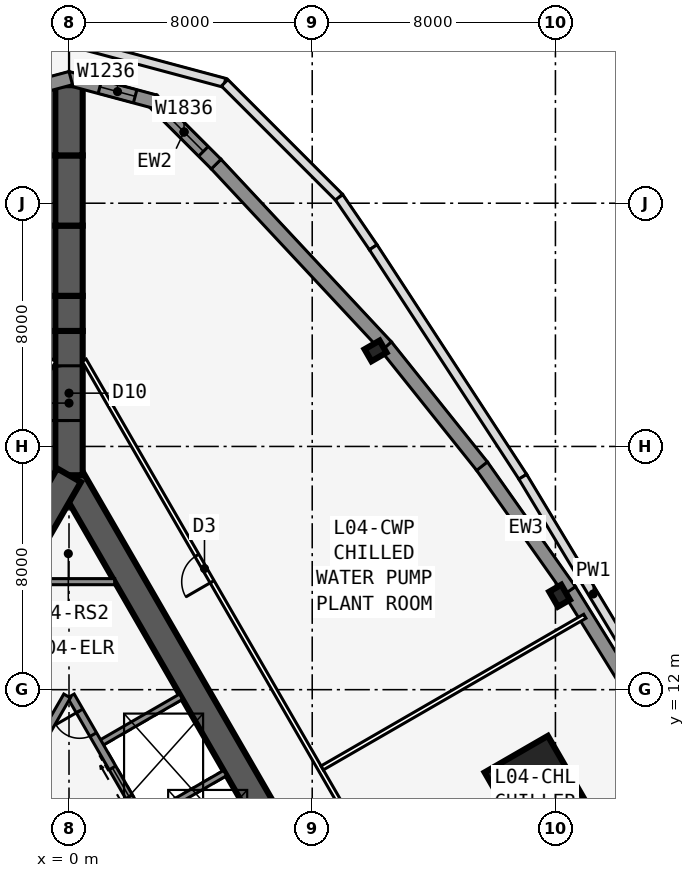
"""IFC4 building model, lengths in metres.
Left out: names, types, materials, properties, quantities, classifications, styles, units other than length and angle.
Written with IfcOpenShell. Run it as: python <this file> out.ifc"""

import sys

from ifc_helpers import new_model, si_unit, direction, frame, frame_2d, origin, origin_2d, place, context, subcontext, project, spatial, polyline, rectangle, i_section, outline, extrude, element, fill, save


model = new_model("IFC4")
c1 = context("Model", 3, precision=1e-05, world=origin(), true_north=direction((0.0, 1.0)))
c2 = subcontext(c1, "Body", "Model", "MODEL_VIEW")
j1 = project(units=[si_unit("LENGTHUNIT", "METRE"), si_unit("PLANEANGLEUNIT", "RADIAN")], contexts=[c1])
p1 = place(None, origin())
s1 = spatial("IfcSite", under=j1, at=p1, CompositionType="ELEMENT")
p2 = place(p1, origin())
s2 = spatial("IfcBuilding", under=s1, at=p2, CompositionType="ELEMENT")
p3 = place(p2, frame((0.0, 0.0, 22.5)))
s3 = spatial("IfcBuildingStorey", under=s2, at=p3, CompositionType="ELEMENT", Elevation=22.5)
p4 = place(p3, frame((16.5, -9.526, 0.0), z_axis=(0.0, 0.0, 1.0), x_axis=(-0.499999749417, 0.866025548458, 0.0)))
e1 = element("IfcWall", 1, at=p4, inside=s3, PredefinedType="SHEAR", context=c2, shape_type="SweptSolid", body=[
    extrude(rectangle(XDim=33.0, YDim=0.9, at=frame_2d((16.5, 0.0))), origin(), (0.0, 0.0, 1.0), 6.0),
])
p5 = place(p4, frame((14.15, 0.0, 0.0)))
e2 = element("IfcOpeningElement", 2, at=p5, cuts=e1, PredefinedType="OPENING", context=c2, shape_type="SweptSolid", body=[
    extrude(rectangle(XDim=1.8, YDim=2.13, at=frame_2d((0.9, 1.065))), frame((0.0, 0.46, 0.0), z_axis=(0.0, -1.0, 0.0), x_axis=(1.0, 0.0, 0.0)), (0.0, 0.0, 1.0), 0.92),
])
p6 = place(p4, frame((12.6, 0.0, 0.0)))
e3 = element("IfcOpeningElement", 3, at=p6, cuts=e1, PredefinedType="OPENING", context=c2, shape_type="SweptSolid", body=[
    extrude(rectangle(XDim=1.0, YDim=2.13, at=frame_2d((0.5, 1.065))), frame((0.0, 0.46, 0.0), z_axis=(0.0, -1.0, 0.0), x_axis=(1.0, 0.0, 0.0)), (0.0, 0.0, 1.0), 0.92),
])
p7 = place(p3, frame((5.379, 2.586, 0.0), z_axis=(0.0, 0.0, 1.0), x_axis=(-0.500001375892, 0.866024609411, 0.0)))
e4 = element("IfcWall", 4, at=p7, inside=s3, PredefinedType="SOLIDWALL", context=c2, shape_type="SweptSolid", body=[
    extrude(rectangle(XDim=10.633, YDim=0.25, at=frame_2d((5.316, 0.0))), origin(), (0.0, 0.0, 1.0), 5.835),
])
p8 = place(p7, frame((9.164, 0.0, 0.0)))
e5 = element("IfcOpeningElement", 5, at=p8, cuts=e4, PredefinedType="OPENING", context=c2, shape_type="SweptSolid", body=[
    extrude(rectangle(XDim=0.9, YDim=2.13, at=frame_2d((0.45, 1.065))), frame((0.0, 0.135, 0.0), z_axis=(0.0, -1.0, 0.0), x_axis=(1.0, 0.0, 0.0)), (0.0, 0.0, 1.0), 0.27),
])
p9 = place(p7, frame((1.0, 0.0, 0.0)))
e6 = element("IfcOpeningElement", 6, at=p9, cuts=e4, PredefinedType="OPENING", context=c2, shape_type="SweptSolid", body=[
    extrude(rectangle(XDim=1.1, YDim=2.13, at=frame_2d((0.55, 1.065))), frame((0.0, 0.135, 0.0), z_axis=(0.0, -1.0, 0.0), x_axis=(1.0, 0.0, 0.0)), (0.0, 0.0, 1.0), 0.27),
])
p10 = place(p7, frame((3.9, 0.0, 0.0)))
e7 = element("IfcOpeningElement", 7, at=p10, cuts=e4, PredefinedType="OPENING", context=c2, shape_type="SweptSolid", body=[
    extrude(rectangle(XDim=1.1, YDim=2.13, at=frame_2d((0.55, 1.065))), frame((0.0, 0.135, 0.0), z_axis=(0.0, -1.0, 0.0), x_axis=(1.0, 0.0, 0.0)), (0.0, 0.0, 1.0), 0.27),
])
p11 = place(p7, frame((6.8, 0.0, 0.0)))
e8 = element("IfcOpeningElement", 8, at=p11, cuts=e4, PredefinedType="OPENING", context=c2, shape_type="SweptSolid", body=[
    extrude(rectangle(XDim=1.1, YDim=2.13, at=frame_2d((0.55, 1.065))), frame((0.0, 0.135, 0.0), z_axis=(0.0, -1.0, 0.0), x_axis=(1.0, 0.0, 0.0)), (0.0, 0.0, 1.0), 0.27),
])
for number, where, z_axis, x_axis in (
    (9, (2.429, 7.696, 0.0), (0.0, 0.0, 1.0), (0.866, 0.5, 0.0)),
    (10, (0.979, 10.207, 0.0), (0.0, 0.0, 1.0), (0.866, 0.5, 0.0)),
):
    element("IfcWall", number, at=place(p3, frame(where, z_axis=z_axis, x_axis=x_axis)), inside=s3, PredefinedType="SOLIDWALL", context=c2, shape_type="SweptSolid", body=[
        extrude(rectangle(XDim=3.125, YDim=0.2, at=frame_2d((1.562, 0.0))), origin(), (0.0, 0.0, 1.0), 5.835),
    ])
p12 = place(p3, frame((0.0, 19.052, 0.0), z_axis=(0.0, 0.0, 1.0), x_axis=(-0.499999749417, -0.866025548458, 0.0)))
e11 = element("IfcWall", 11, at=p12, inside=s3, PredefinedType="SHEAR", context=c2, shape_type="SweptSolid", body=[
    extrude(rectangle(XDim=33.0, YDim=0.9, at=frame_2d((16.5, 0.0))), origin(), (0.0, 0.0, 1.0), 6.0),
])
p13 = place(p12, frame((14.15, 0.0, 0.0)))
e12 = element("IfcOpeningElement", 12, at=p13, cuts=e11, PredefinedType="OPENING", context=c2, shape_type="SweptSolid", body=[
    extrude(rectangle(XDim=1.8, YDim=2.13, at=frame_2d((0.9, 1.065))), frame((0.0, 0.46, 0.0), z_axis=(0.0, -1.0, 0.0), x_axis=(1.0, 0.0, 0.0)), (0.0, 0.0, 1.0), 0.92),
])
p14 = place(p12, frame((12.6, 0.0, 0.0)))
e13 = element("IfcOpeningElement", 13, at=p14, cuts=e11, PredefinedType="OPENING", context=c2, shape_type="SweptSolid", body=[
    extrude(rectangle(XDim=1.0, YDim=2.13, at=frame_2d((0.5, 1.065))), frame((0.0, 0.46, 0.0), z_axis=(0.0, -1.0, 0.0), x_axis=(1.0, 0.0, 0.0)), (0.0, 0.0, 1.0), 0.92),
])
p15 = place(p3, frame((-0.062, 11.794, 0.0), z_axis=(0.0, 0.0, 1.0), x_axis=(-0.500006680225, -0.86602154692, 0.0)))
e14 = element("IfcWall", 14, at=p15, inside=s3, PredefinedType="SOLIDWALL", context=c2, shape_type="SweptSolid", body=[
    extrude(rectangle(XDim=7.733, YDim=0.25, at=frame_2d((3.866, 0.0))), origin(), (0.0, 0.0, 1.0), 5.835),
])
p16 = place(p3, frame((0.0, 19.052, 0.0), z_axis=(0.0, 0.0, 1.0), x_axis=(0.0, 1.0, 0.0)))
e15 = element("IfcWall", 15, at=p16, inside=s3, PredefinedType="SHEAR", context=c2, shape_type="SweptSolid", body=[
    extrude(rectangle(XDim=4.746, YDim=0.9, at=frame_2d((2.373, 0.0))), origin(), (0.0, 0.0, 1.0), 6.0),
])
p17 = place(p16, frame((1.8, 0.0, 0.0)))
e16 = element("IfcOpeningElement", 16, at=p17, cuts=e15, PredefinedType="OPENING", context=c2, shape_type="SweptSolid", body=[
    extrude(rectangle(XDim=1.8, YDim=2.13, at=frame_2d((0.9, 1.065))), frame((0.0, 0.46, 0.0), z_axis=(0.0, -1.0, 0.0), x_axis=(1.0, 0.0, 0.0)), (0.0, 0.0, 1.0), 0.92),
])
p18 = place(p3, frame((0.0, 23.799, 0.0), z_axis=(0.0, 0.0, 1.0), x_axis=(0.0, 1.0, 0.0)))
e17 = element("IfcWall", 17, at=p18, inside=s3, PredefinedType="SHEAR", context=c2, shape_type="SweptSolid", body=[
    extrude(rectangle(XDim=1.155, YDim=0.9, at=frame_2d((0.577, 0.0))), origin(), (0.0, 0.0, 1.0), 6.0),
])
p19 = place(p3, frame((0.0, 24.953, 0.0), z_axis=(0.0, 0.0, 1.0), x_axis=(0.0, 1.0, 0.0)))
e18 = element("IfcWall", 18, at=p19, inside=s3, PredefinedType="SHEAR", context=c2, shape_type="SweptSolid", body=[
    extrude(rectangle(XDim=2.309, YDim=0.9, at=frame_2d((1.155, 0.0))), origin(), (0.0, 0.0, 1.0), 6.0),
])
p20 = place(p3, frame((0.0, 27.263, 0.0), z_axis=(0.0, 0.0, 1.0), x_axis=(0.0, 1.0, 0.0)))
e19 = element("IfcWall", 19, at=p20, inside=s3, PredefinedType="SHEAR", context=c2, shape_type="SweptSolid", body=[
    extrude(rectangle(XDim=2.31, YDim=0.9, at=frame_2d((1.155, 0.0))), origin(), (0.0, 0.0, 1.0), 6.0),
])
p21 = place(p3, frame((0.0, 29.572, 0.0), z_axis=(0.0, 0.0, 1.0), x_axis=(0.0, 1.0, 0.0)))
e20 = element("IfcWall", 20, at=p21, inside=s3, PredefinedType="SHEAR", context=c2, shape_type="SweptSolid", body=[
    extrude(rectangle(XDim=2.309, YDim=0.9, at=frame_2d((1.155, 0.0))), origin(), (0.0, 0.0, 1.0), 6.0),
])
for number, where, z_axis, x_axis in (
    (21, (16.137, 15.09, 0.0), (0.0, 0.0, 1.0), (0.866, 0.5, 0.0)),
    (22, (10.083, 23.142, 0.0), (0.0, 0.0, 1.0), (-0.5, 0.866, 0.0)),
):
    element("IfcColumn", number, at=place(p3, frame(where, z_axis=z_axis, x_axis=x_axis)), inside=s3, PredefinedType="COLUMN", context=c2, shape_type="SweptSolid", body=[
        extrude(i_section(OverallWidth=0.455, OverallDepth=0.569, WebThickness=0.078, FlangeThickness=0.125, at=origin_2d()), origin(), (0.0, 0.0, 1.0), 6.0),
    ])
p22 = place(p3, frame((15.312, 8.84, 0.0), z_axis=(0.0, 0.0, 1.0), x_axis=(0.866025403784, 0.5, 0.0)))
e23 = element("IfcColumn", 23, at=p22, inside=s3, PredefinedType="COLUMN", context=c2, shape_type="SweptSolid", body=[
    extrude(rectangle(XDim=2.4, YDim=2.4, at=origin_2d()), origin(), (0.0, 0.0, 1.0), 6.0),
])
p23 = place(p3, frame((19.097, 11.018, 0.0), z_axis=(0.0, 0.0, 1.0), x_axis=(-0.52611097126, 0.850415925251, 0.0)))
e24 = element("IfcWall", 24, at=p23, inside=s3, PredefinedType="SOLIDWALL", context=c2, shape_type="SweptSolid", body=[
    extrude(outline(polyline([(0.0, 0.0), (5.002, 0.0), (5.002, 5.835), (0.0, 5.835), (0.0, 0.0)]), holes=[polyline([(4.401, 2.917), (4.336, 3.409), (4.146, 3.867), (3.844, 4.261), (3.451, 4.563), (2.993, 4.753), (2.501, 4.817), (2.01, 4.753), (1.551, 4.563), (1.158, 4.261), (0.856, 3.867), (0.666, 3.409), (0.601, 2.917), (0.666, 2.426), (0.856, 1.968), (1.158, 1.574), (1.551, 1.272), (2.01, 1.082), (2.501, 1.018), (2.993, 1.082), (3.451, 1.272), (3.844, 1.574), (4.146, 1.968), (4.336, 2.426), (4.401, 2.917)])]), frame((0.0, 0.225, 0.0), z_axis=(0.0, -1.0, 0.0), x_axis=(1.0, 0.0, 0.0)), (0.0, 0.0, 1.0), 0.45),
])
p24 = place(p3, frame((16.473, 15.26, 0.0), z_axis=(0.0, 0.0, 1.0), x_axis=(-0.5766431066, 0.81699616132, 0.0)))
e25 = element("IfcWall", 25, at=p24, inside=s3, PredefinedType="SOLIDWALL", context=c2, shape_type="SweptSolid", body=[
    extrude(outline(polyline([(0.0, 0.0), (5.021, 0.0), (5.021, 5.835), (0.0, 5.835), (0.0, 0.0)]), holes=[polyline([(4.41, 2.917), (4.346, 3.409), (4.156, 3.867), (3.854, 4.261), (3.46, 4.563), (3.002, 4.753), (2.51, 4.817), (2.019, 4.753), (1.56, 4.563), (1.167, 4.261), (0.865, 3.867), (0.675, 3.409), (0.61, 2.917), (0.675, 2.426), (0.865, 1.968), (1.167, 1.574), (1.56, 1.272), (2.019, 1.082), (2.51, 1.018), (3.002, 1.082), (3.46, 1.272), (3.854, 1.574), (4.156, 1.968), (4.346, 2.426), (4.41, 2.917)])]), frame((0.0, 0.225, 0.0), z_axis=(0.0, -1.0, 0.0), x_axis=(1.0, 0.0, 0.0)), (0.0, 0.0, 1.0), 0.45),
])
p25 = place(p3, frame((13.586, 19.352, 0.0), z_axis=(0.0, 0.0, 1.0), x_axis=(-0.624594965756, 0.780948864364, 0.0)))
e26 = element("IfcWall", 26, at=p25, inside=s3, PredefinedType="SOLIDWALL", context=c2, shape_type="SweptSolid", body=[
    extrude(outline(polyline([(0.0, 0.0), (5.058, 0.0), (5.058, 5.835), (0.0, 5.835), (0.0, 0.0)]), holes=[polyline([(4.429, 2.917), (4.364, 3.409), (4.174, 3.867), (3.872, 4.261), (3.479, 4.563), (3.021, 4.753), (2.529, 4.817), (2.037, 4.753), (1.579, 4.563), (1.185, 4.261), (0.883, 3.867), (0.694, 3.409), (0.629, 2.917), (0.694, 2.426), (0.883, 1.968), (1.185, 1.574), (1.579, 1.272), (2.037, 1.082), (2.529, 1.018), (3.021, 1.082), (3.479, 1.272), (3.872, 1.574), (4.174, 1.968), (4.364, 2.426), (4.429, 2.917)])]), frame((0.0, 0.225, 0.0), z_axis=(0.0, -1.0, 0.0), x_axis=(1.0, 0.0, 0.0)), (0.0, 0.0, 1.0), 0.45),
])
p26 = place(p3, frame((10.438, 23.288, 0.0), z_axis=(0.0, 0.0, 1.0), x_axis=(-0.682290707137, 0.73108097428, 0.0)))
e27 = element("IfcWall", 27, at=p26, inside=s3, PredefinedType="SOLIDWALL", context=c2, shape_type="SweptSolid", body=[
    extrude(outline(polyline([(0.0, 0.0), (8.211, 0.0), (8.211, 5.835), (0.0, 5.835), (0.0, 0.0)]), holes=[polyline([(6.406, 2.917), (6.327, 3.513), (6.097, 4.067), (5.732, 4.544), (5.256, 4.909), (4.701, 5.139), (4.106, 5.218), (3.51, 5.139), (2.956, 4.909), (2.479, 4.544), (2.114, 4.067), (1.884, 3.513), (1.806, 2.917), (1.884, 2.322), (2.114, 1.768), (2.479, 1.291), (2.956, 0.926), (3.51, 0.696), (4.106, 0.617), (4.701, 0.696), (5.256, 0.926), (5.732, 1.291), (6.097, 1.768), (6.327, 2.322), (6.406, 2.917)])]), frame((0.0, 0.225, 0.0), z_axis=(0.0, -1.0, 0.0), x_axis=(1.0, 0.0, 0.0)), (0.0, 0.0, 1.0), 0.45),
])
p27 = place(p3, frame((4.841, 29.286, 0.0), z_axis=(0.0, 0.0, 1.0), x_axis=(-0.707106781187, 0.707106781187, 0.0)))
e28 = element("IfcWall", 28, at=p27, inside=s3, PredefinedType="SOLIDWALL", context=c2, shape_type="SweptSolid", body=[
    extrude(rectangle(XDim=2.988, YDim=0.45, at=frame_2d((1.494, 0.0))), origin(), (0.0, 0.0, 1.0), 5.835),
])
p28 = place(p27, frame((0.594, 0.0, 0.9)))
e29 = element("IfcOpeningElement", 29, at=p28, cuts=e28, PredefinedType="OPENING", context=c2, shape_type="SweptSolid", body=[
    extrude(rectangle(XDim=1.8, YDim=3.6, at=frame_2d((0.9, 1.8))), frame((0.0, 0.235, 0.0), z_axis=(0.0, -1.0, 0.0), x_axis=(1.0, 0.0, 0.0)), (0.0, 0.0, 1.0), 0.47),
])
p29 = place(p3, frame((2.829, 31.341, 0.0), z_axis=(0.0, 0.0, 1.0), x_axis=(-0.965930548995, 0.258801419081, 0.0)))
e30 = element("IfcWall", 30, at=p29, inside=s3, PredefinedType="SOLIDWALL", context=c2, shape_type="SweptSolid", body=[
    extrude(outline(polyline([(2.989, 0.225), (2.929, 0.225), (2.438, 0.093), (2.402, 0.225), (0.0, 0.225), (0.0, -0.225), (2.989, -0.225), (2.989, 0.225)])), origin(), (0.0, 0.0, 1.0), 5.835),
])
p30 = place(p29, frame((0.676, 0.0, 0.9)))
e31 = element("IfcOpeningElement", 31, at=p30, cuts=e30, PredefinedType="OPENING", context=c2, shape_type="SweptSolid", body=[
    extrude(rectangle(XDim=1.2, YDim=3.6, at=frame_2d((0.6, 1.8))), frame((0.0, 0.235, 0.0), z_axis=(0.0, -1.0, 0.0), x_axis=(1.0, 0.0, 0.0)), (0.0, 0.0, 1.0), 0.47),
])
p31 = place(p3, frame((0.058, 32.114, 0.0), z_axis=(0.0, 0.0, 1.0), x_axis=(-0.965930548995, -0.258801419081, 0.0)))
e32 = element("IfcWall", 32, at=p31, inside=s3, PredefinedType="SOLIDWALL", context=c2, shape_type="SweptSolid", body=[
    extrude(outline(polyline([(2.989, 0.225), (0.586, 0.225), (0.551, 0.093), (0.059, 0.225), (0.0, 0.225), (0.0, -0.225), (2.989, -0.225), (2.989, 0.225)])), origin(), (0.0, 0.0, 1.0), 5.835),
])
p32 = place(p31, frame((1.113, 0.0, 0.9)))
e33 = element("IfcOpeningElement", 33, at=p32, cuts=e32, PredefinedType="OPENING", context=c2, shape_type="SweptSolid", body=[
    extrude(rectangle(XDim=1.2, YDim=3.6, at=frame_2d((0.6, 1.8))), frame((0.0, 0.235, 0.0), z_axis=(0.0, -1.0, 0.0), x_axis=(1.0, 0.0, 0.0)), (0.0, 0.0, 1.0), 0.47),
])
for number, where, z_axis, x_axis in (
    (34, (-5.119, 31.959, 0.0), (0.0, 0.0, 1.0), (0.966, 0.259, 0.0)),
    (35, (0.0, 33.331, 0.0), (0.0, 0.0, 1.0), (0.966, -0.259, 0.0)),
):
    element("IfcWall", number, at=place(p3, frame(where, z_axis=z_axis, x_axis=x_axis)), inside=s3, PredefinedType="PARAPET", context=c2, shape_type="SweptSolid", body=[
        extrude(rectangle(XDim=5.299, YDim=0.3, at=frame_2d((2.65, 0.0))), origin(), (0.0, 0.0, 1.0), 1.1),
    ])
p33 = place(p3, frame((5.119, 31.959, 0.0), z_axis=(0.0, 0.0, 1.0), x_axis=(0.707106781187, -0.707106781187, 0.0)))
e36 = element("IfcWall", 36, at=p33, inside=s3, PredefinedType="PARAPET", context=c2, shape_type="SweptSolid", body=[
    extrude(rectangle(XDim=5.325, YDim=0.3, at=frame_2d((2.663, 0.0))), origin(), (0.0, 0.0, 1.0), 1.1),
])
p34 = place(p3, frame((8.884, 28.194, 0.0), z_axis=(0.0, 0.0, 1.0), x_axis=(0.564147300062, -0.825674163235, 0.0)))
e37 = element("IfcWall", 37, at=p34, inside=s3, PredefinedType="PARAPET", context=c2, shape_type="SweptSolid", body=[
    extrude(rectangle(XDim=1.99, YDim=0.3, at=frame_2d((0.995, 0.0))), origin(), (0.0, 0.0, 1.0), 1.1),
])
p35 = place(p3, frame((10.007, 26.551, 0.0), z_axis=(0.0, 0.0, 1.0), x_axis=(0.545976753286, -0.83780032518, 0.0)))
e38 = element("IfcWall", 38, at=p35, inside=s3, PredefinedType="PARAPET", context=c2, shape_type="SweptSolid", body=[
    extrude(rectangle(XDim=9.009, YDim=0.3, at=frame_2d((4.504, 0.0))), origin(), (0.0, 0.0, 1.0), 1.1),
])
p36 = place(p3, frame((14.925, 19.003, 0.0), z_axis=(0.0, 0.0, 1.0), x_axis=(0.515513067343, -0.856881717274, 0.0)))
e39 = element("IfcWall", 39, at=p36, inside=s3, PredefinedType="PARAPET", context=c2, shape_type="SweptSolid", body=[
    extrude(rectangle(XDim=8.996, YDim=0.3, at=frame_2d((4.498, 0.0))), origin(), (0.0, 0.0, 1.0), 1.1),
])
p37 = place(p3, frame((20.027, -10.985, 0.0), z_axis=(0.0, 0.0, 1.0), x_axis=(-0.500001677587, 0.866024435227, 0.0)))
e40 = element("IfcWall", 40, at=p37, inside=s3, PredefinedType="PARTITIONING", context=c2, shape_type="SweptSolid", body=[
    extrude(rectangle(XDim=39.054, YDim=0.15, at=frame_2d((19.527, 0.0))), origin(), (0.0, 0.0, 1.0), 5.835),
])
p38 = place(p37, frame((6.914, 0.0, 0.0)))
e41 = element("IfcOpeningElement", 41, at=p38, cuts=e40, PredefinedType="OPENING", context=c2, shape_type="SweptSolid", body=[
    extrude(rectangle(XDim=1.0, YDim=2.13, at=frame_2d((0.5, 1.065))), frame((0.0, 0.085, 0.0), z_axis=(0.0, -1.0, 0.0), x_axis=(1.0, 0.0, 0.0)), (0.0, 0.0, 1.0), 0.17),
])
p39 = place(p37, frame((18.527, 0.0, 0.0)))
e42 = element("IfcOpeningElement", 42, at=p39, cuts=e40, PredefinedType="OPENING", context=c2, shape_type="SweptSolid", body=[
    extrude(rectangle(XDim=1.0, YDim=2.13, at=frame_2d((0.5, 1.065))), frame((0.0, 0.085, 0.0), z_axis=(0.0, -1.0, 0.0), x_axis=(1.0, 0.0, 0.0)), (0.0, 0.0, 1.0), 0.17),
])
p40 = place(p37, frame((30.64, 0.0, 0.0)))
e43 = element("IfcOpeningElement", 43, at=p40, cuts=e40, PredefinedType="OPENING", context=c2, shape_type="SweptSolid", body=[
    extrude(rectangle(XDim=1.0, YDim=2.13, at=frame_2d((0.5, 1.065))), frame((0.0, 0.085, 0.0), z_axis=(0.0, -1.0, 0.0), x_axis=(1.0, 0.0, 0.0)), (0.0, 0.0, 1.0), 0.17),
])
p41 = place(p3, frame((8.329, 9.427, 0.0), z_axis=(0.0, 0.0, 1.0), x_axis=(0.866027840197, 0.499995779986, 0.0)))
e44 = element("IfcWall", 44, at=p41, inside=s3, PredefinedType="PARTITIONING", context=c2, shape_type="SweptSolid", body=[
    extrude(rectangle(XDim=9.974, YDim=0.15, at=frame_2d((4.987, 0.0))), origin(), (0.0, 0.0, 1.0), 5.835),
])
p42 = place(p3, frame((-0.5, 22.836, 0.0), z_axis=(0.0, 0.0, 1.0), x_axis=(-0.500001677587, -0.866024435227, 0.0)))
e45 = element("IfcWall", 45, at=p42, inside=s3, PredefinedType="PARTITIONING", context=c2, shape_type="SweptSolid", body=[
    extrude(rectangle(XDim=39.054, YDim=0.15, at=frame_2d((19.527, 0.0))), origin(), (0.0, 0.0, 1.0), 5.835),
])
p43 = place(p42, frame((5.914, 0.0, 0.0)))
e46 = element("IfcOpeningElement", 46, at=p43, cuts=e45, PredefinedType="OPENING", context=c2, shape_type="SweptSolid", body=[
    extrude(rectangle(XDim=1.0, YDim=2.13, at=frame_2d((0.5, 1.065))), frame((0.0, 0.085, 0.0), z_axis=(0.0, -1.0, 0.0), x_axis=(1.0, 0.0, 0.0)), (0.0, 0.0, 1.0), 0.17),
])
p44 = place(p42, frame((16.527, 0.0, 0.0)))
e47 = element("IfcOpeningElement", 47, at=p44, cuts=e45, PredefinedType="OPENING", context=c2, shape_type="SweptSolid", body=[
    extrude(rectangle(XDim=1.0, YDim=2.13, at=frame_2d((0.5, 1.065))), frame((0.0, 0.085, 0.0), z_axis=(0.0, -1.0, 0.0), x_axis=(1.0, 0.0, 0.0)), (0.0, 0.0, 1.0), 0.17),
])
p45 = place(p42, frame((29.64, 0.0, 0.0)))
e48 = element("IfcOpeningElement", 48, at=p45, cuts=e45, PredefinedType="OPENING", context=c2, shape_type="SweptSolid", body=[
    extrude(rectangle(XDim=1.0, YDim=2.13, at=frame_2d((0.5, 1.065))), frame((0.0, 0.085, 0.0), z_axis=(0.0, -1.0, 0.0), x_axis=(1.0, 0.0, 0.0)), (0.0, 0.0, 1.0), 0.17),
])
p46 = place(p3, frame((-1.501, 15.552, 0.0), z_axis=(0.0, 0.0, 1.0), x_axis=(1.0, 0.0, 0.0)))
e49 = element("IfcWall", 49, at=p46, inside=s3, PredefinedType="SOLIDWALL", context=c2, shape_type="SweptSolid", body=[
    extrude(rectangle(XDim=3.002, YDim=0.2, at=frame_2d((1.501, 0.0))), origin(), (0.0, 0.0, 1.0), 5.835),
])
p47 = place(p28, origin())
e50 = element("IfcWindow", 50, at=p47, inside=s3, PartitioningType="SINGLE_PANEL", PredefinedType="WINDOW", context=c2, shape_type="SweptSolid", body=[
    extrude(rectangle(XDim=1.8, YDim=3.6, at=frame_2d((0.9, 1.8))), frame((0.0, 0.03, 0.0), z_axis=(0.0, -1.0, 0.0), x_axis=(1.0, 0.0, 0.0)), (0.0, 0.0, 1.0), 0.06),
])
fill(e29, e50)
p48 = place(p30, origin())
e51 = element("IfcWindow", 51, at=p48, inside=s3, PartitioningType="SINGLE_PANEL", PredefinedType="WINDOW", context=c2, shape_type="SweptSolid", body=[
    extrude(rectangle(XDim=1.2, YDim=3.6, at=frame_2d((0.6, 1.8))), frame((0.0, 0.03, 0.0), z_axis=(0.0, -1.0, 0.0), x_axis=(1.0, 0.0, 0.0)), (0.0, 0.0, 1.0), 0.06),
])
fill(e31, e51)
p49 = place(p40, origin())
e52 = element("IfcDoor", 52, at=p49, inside=s3, OperationType="SINGLE_SWING_LEFT", PredefinedType="DOOR", context=c2, shape_type="SweptSolid", body=[
    extrude(rectangle(XDim=1.0, YDim=2.13, at=frame_2d((0.5, 1.065))), frame((0.0, 0.025, 0.0), z_axis=(0.0, -1.0, 0.0), x_axis=(1.0, 0.0, 0.0)), (0.0, 0.0, 1.0), 0.05),
])
fill(e43, e52)
p50 = place(p17, origin())
e53 = element("IfcDoor", 53, at=p50, inside=s3, OperationType="DOUBLE_DOOR_DOUBLE_SWING", PredefinedType="DOOR", context=c2, shape_type="SweptSolid", body=[
    extrude(rectangle(XDim=1.8, YDim=2.13, at=frame_2d((0.9, 1.065))), frame((0.0, 0.025, 0.0), z_axis=(0.0, -1.0, 0.0), x_axis=(1.0, 0.0, 0.0)), (0.0, 0.0, 1.0), 0.05),
])
fill(e16, e53)
p51 = place(p8, origin())
e54 = element("IfcDoor", 54, at=p51, inside=s3, OperationType="SINGLE_SWING_RIGHT", PredefinedType="DOOR", context=c2, shape_type="SweptSolid", body=[
    extrude(rectangle(XDim=0.9, YDim=2.13, at=frame_2d((0.45, 1.065))), frame((0.0, 0.025, 0.0), z_axis=(0.0, -1.0, 0.0), x_axis=(1.0, 0.0, 0.0)), (0.0, 0.0, 1.0), 0.05),
])
fill(e5, e54)
p52 = place(p11, origin())
e55 = element("IfcDoor", 55, at=p52, inside=s3, OperationType="DOUBLE_DOOR_SLIDING", PredefinedType="USERDEFINED", context=c2, shape_type="SweptSolid", body=[
    extrude(rectangle(XDim=1.1, YDim=2.13, at=frame_2d((0.55, 1.065))), frame((0.0, 0.025, 0.0), z_axis=(0.0, -1.0, 0.0), x_axis=(1.0, 0.0, 0.0)), (0.0, 0.0, 1.0), 0.05),
])
fill(e8, e55)
save(model, sys.argv[1])
